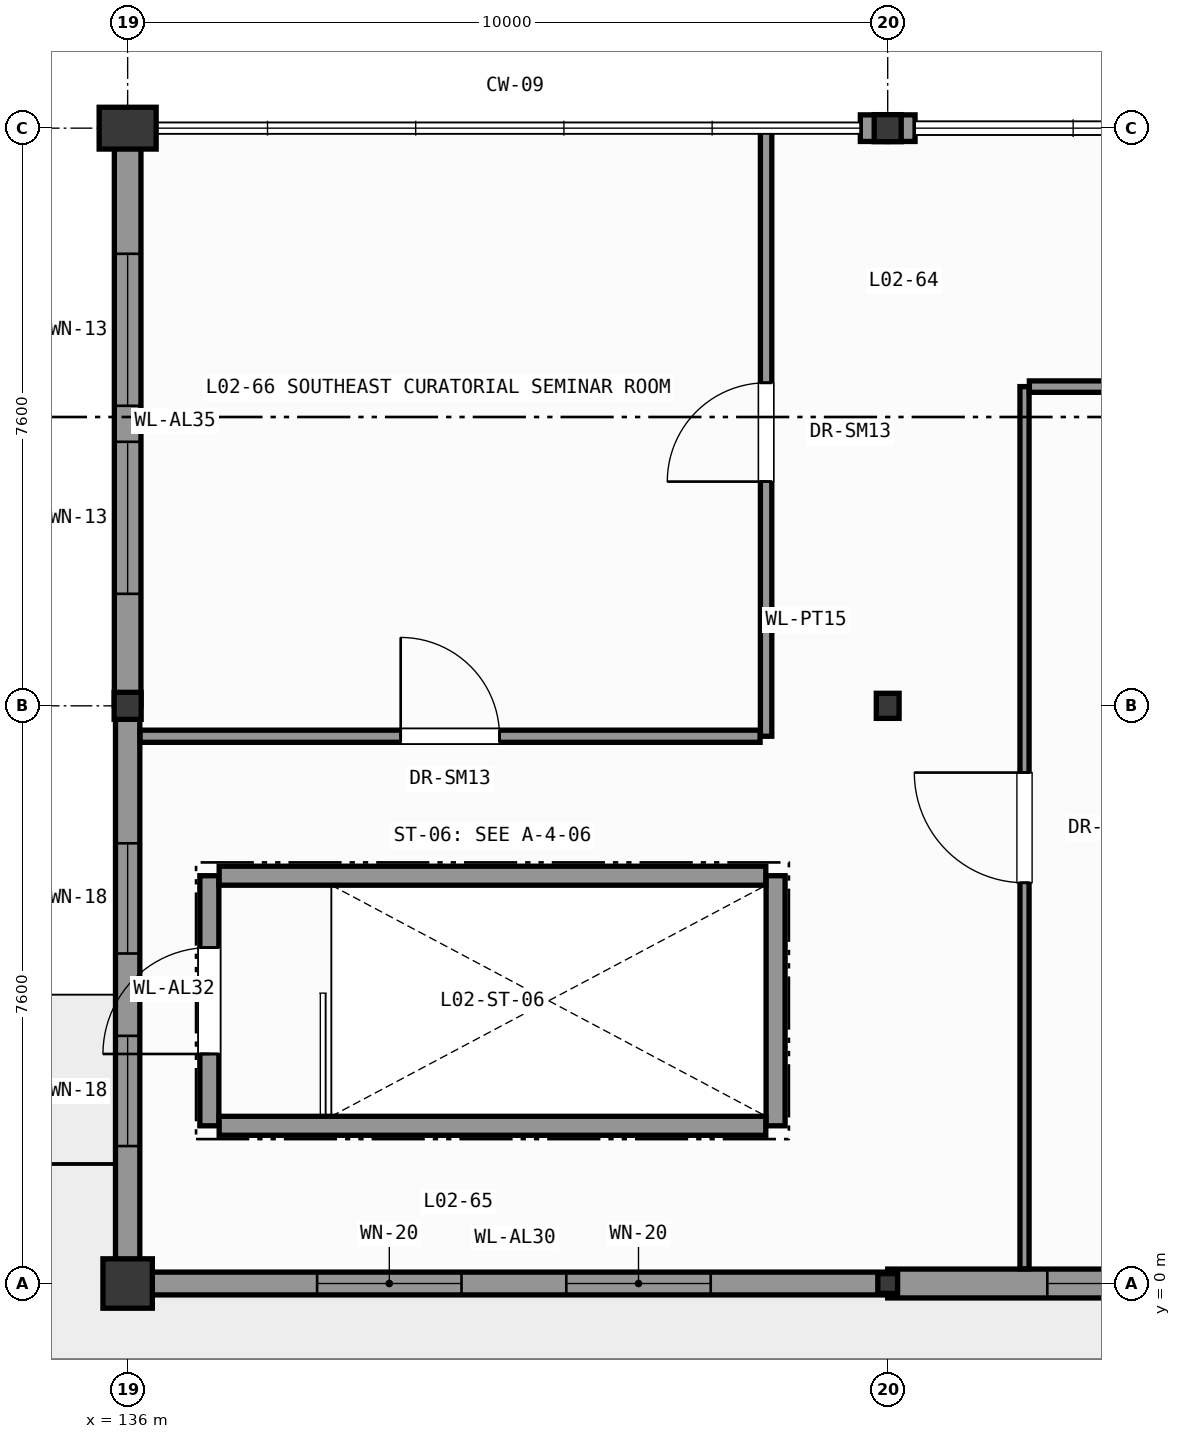
"""IFC4 building model, lengths in metres.
Left out: names, types, materials, properties, quantities, classifications, styles, units other than length and angle.
Written with IfcOpenShell. Run it as: python <this file> out.ifc"""

import sys

from ifc_helpers import new_model, si_unit, direction, frame, frame_2d, origin, origin_2d, place, context, subcontext, project, spatial, rectangle, hollow_rectangle, hollow_circle, i_section, extrude, element, fill, save


model = new_model("IFC4")
c1 = context("Model", 3, precision=1e-05, world=origin(), true_north=direction((0.0, 1.0)))
c2 = subcontext(c1, "Body", "Model", "MODEL_VIEW")
j1 = project(units=[si_unit("LENGTHUNIT", "METRE"), si_unit("PLANEANGLEUNIT", "RADIAN")], contexts=[c1])
p1 = place(None, origin())
s1 = spatial("IfcSite", under=j1, at=p1, CompositionType="ELEMENT")
p2 = place(p1, origin())
s2 = spatial("IfcBuilding", under=s1, at=p2, CompositionType="ELEMENT")
p3 = place(p2, frame((0.0, 0.0, 7.8)))
s3 = spatial("IfcBuildingStorey", under=s2, at=p3, CompositionType="ELEMENT", Elevation=7.8)
p4 = place(p3, frame((136.0, 0.0, 0.0), z_axis=(0.0, 0.0, 1.0), x_axis=(1.0, 0.0, 0.0)))
e1 = element("IfcColumn", 1, at=p4, inside=s3, PredefinedType="PILASTER", context=c2, shape_type="SweptSolid", body=[
    extrude(rectangle(XDim=0.65, YDim=0.65, at=origin_2d()), origin(), (0.0, 0.0, 1.0), 5.4),
])
p5 = place(p3, frame((136.0, 7.6, 0.0), z_axis=(0.0, 0.0, 1.0), x_axis=(1.0, 0.0, 0.0)))
e2 = element("IfcColumn", 2, at=p5, inside=s3, PredefinedType="COLUMN", context=c2, shape_type="SweptSolid", body=[
    extrude(hollow_circle(Radius=0.178, WallThickness=0.016, at=origin_2d()), origin(), (0.0, 0.0, 1.0), 5.4),
])
p6 = place(p3, frame((136.0, 15.2, 0.0), z_axis=(0.0, 0.0, 1.0), x_axis=(1.0, 0.0, 0.0)))
e3 = element("IfcColumn", 3, at=p6, inside=s3, PredefinedType="PILASTER", context=c2, shape_type="SweptSolid", body=[
    extrude(rectangle(XDim=0.75, YDim=0.55, at=origin_2d()), origin(), (0.0, 0.0, 1.0), 5.4),
])
p7 = place(p3, frame((146.0, 0.0, 0.0), z_axis=(0.0, 0.0, 1.0), x_axis=(1.0, 0.0, 0.0)))
e4 = element("IfcColumn", 4, at=p7, inside=s3, PredefinedType="COLUMN", context=c2, shape_type="SweptSolid", body=[
    extrude(hollow_rectangle(XDim=0.26, YDim=0.26, WallThickness=0.012, InnerFilletRadius=0.012, OuterFilletRadius=0.025, at=origin_2d()), origin(), (0.0, 0.0, 1.0), 5.4),
])
p8 = place(p3, frame((146.0, 7.6, 0.0), z_axis=(0.0, 0.0, 1.0), x_axis=(1.0, 0.0, 0.0)))
e5 = element("IfcColumn", 5, at=p8, inside=s3, PredefinedType="COLUMN", context=c2, shape_type="SweptSolid", body=[
    extrude(i_section(OverallWidth=0.3, OverallDepth=0.33, WebThickness=0.01, FlangeThickness=0.017, FilletRadius=0.027, at=origin_2d()), origin(), (0.0, 0.0, 1.0), 5.4),
])
p9 = place(p3, frame((146.0, 15.2, 0.0), z_axis=(0.0, 0.0, 1.0), x_axis=(1.0, 0.0, 0.0)))
e6 = element("IfcColumn", 6, at=p9, inside=s3, PredefinedType="COLUMN", context=c2, shape_type="SweptSolid", body=[
    extrude(hollow_circle(Radius=0.178, WallThickness=0.016, at=origin_2d()), origin(), (0.0, 0.0, 1.0), 5.4),
])
for number, where, z_axis, x_axis in (
    (7, (146.36, 15.2, 0.0), (0.0, 0.0, 1.0), (-1.0, 0.0, 0.0)),
    (8, (146.0, 15.2, 0.0), (0.0, 0.0, 1.0), (-1.0, 0.0, 0.0)),
    (9, (136.36, 15.2, 0.0), (0.0, 0.0, 1.0), (-1.0, 0.0, 0.0)),
):
    element("IfcWall", number, at=place(p3, frame(where, z_axis=z_axis, x_axis=x_axis)), inside=s3, PredefinedType="SOLIDWALL", context=c2, shape_type="SweptSolid", body=[
        extrude(rectangle(XDim=0.36, YDim=0.35, at=frame_2d((0.18, 0.0))), origin(), (0.0, 0.0, 1.0), 4.685),
    ])
p10 = place(p3, frame((136.0, 7.6, 0.0), z_axis=(0.0, 0.0, 1.0), x_axis=(0.0, 1.0, 0.0)))
e10 = element("IfcWall", 10, at=p10, inside=s3, PredefinedType="SOLIDWALL", context=c2, shape_type="SweptSolid", body=[
    extrude(rectangle(XDim=7.421, YDim=0.35, at=frame_2d((3.71, 0.0))), origin(), (0.0, 0.0, 1.0), 4.635),
])
p11 = place(p10, frame((1.474, 0.0, 0.95)))
e11 = element("IfcOpeningElement", 11, at=p11, cuts=e10, PredefinedType="OPENING", context=c2, shape_type="SweptSolid", body=[
    extrude(rectangle(XDim=2.0, YDim=2.2, at=frame_2d((1.0, 1.1))), frame((0.0, 0.185, 0.0), z_axis=(0.0, -1.0, 0.0), x_axis=(1.0, 0.0, 0.0)), (0.0, 0.0, 1.0), 0.37),
])
p12 = place(p10, frame((3.947, 0.0, 0.95)))
e12 = element("IfcOpeningElement", 12, at=p12, cuts=e10, PredefinedType="OPENING", context=c2, shape_type="SweptSolid", body=[
    extrude(rectangle(XDim=2.0, YDim=2.2, at=frame_2d((1.0, 1.1))), frame((0.0, 0.185, 0.0), z_axis=(0.0, -1.0, 0.0), x_axis=(1.0, 0.0, 0.0)), (0.0, 0.0, 1.0), 0.37),
])
p13 = place(p3, frame((136.0, 0.0, 0.0), z_axis=(0.0, 0.0, 1.0), x_axis=(0.0, 1.0, 0.0)))
e13 = element("IfcWall", 13, at=p13, inside=s3, PredefinedType="SOLIDWALL", context=c2, shape_type="SweptSolid", body=[
    extrude(rectangle(XDim=7.6, YDim=0.32, at=frame_2d((3.8, 0.0))), origin(), (0.0, 0.0, 1.0), 4.635),
])
p14 = place(p13, frame((1.808, 0.0, 0.95)))
e14 = element("IfcOpeningElement", 14, at=p14, cuts=e13, PredefinedType="OPENING", context=c2, shape_type="SweptSolid", body=[
    extrude(rectangle(XDim=1.45, YDim=2.5, at=frame_2d((0.725, 1.25))), frame((0.0, 0.17, 0.0), z_axis=(0.0, -1.0, 0.0), x_axis=(1.0, 0.0, 0.0)), (0.0, 0.0, 1.0), 0.34),
])
p15 = place(p13, frame((4.342, 0.0, 0.95)))
e15 = element("IfcOpeningElement", 15, at=p15, cuts=e13, PredefinedType="OPENING", context=c2, shape_type="SweptSolid", body=[
    extrude(rectangle(XDim=1.45, YDim=2.5, at=frame_2d((0.725, 1.25))), frame((0.0, 0.17, 0.0), z_axis=(0.0, -1.0, 0.0), x_axis=(1.0, 0.0, 0.0)), (0.0, 0.0, 1.0), 0.34),
])
p16 = place(p3, frame((146.0, 0.0, 0.0), z_axis=(0.0, 0.0, 1.0), x_axis=(-1.0, 0.0, 0.0)))
e16 = element("IfcWall", 16, at=p16, inside=s3, PredefinedType="SOLIDWALL", context=c2, shape_type="SweptSolid", body=[
    extrude(rectangle(XDim=9.836, YDim=0.3, at=frame_2d((4.918, 0.0))), origin(), (0.0, 0.0, 1.0), 4.745),
])
p17 = place(p16, frame((2.329, 0.0, 0.95)))
e17 = element("IfcOpeningElement", 17, at=p17, cuts=e16, PredefinedType="OPENING", context=c2, shape_type="SweptSolid", body=[
    extrude(rectangle(XDim=1.9, YDim=2.9, at=frame_2d((0.95, 1.45))), frame((0.0, 0.16, 0.0), z_axis=(0.0, -1.0, 0.0), x_axis=(1.0, 0.0, 0.0)), (0.0, 0.0, 1.0), 0.32),
])
p18 = place(p16, frame((5.607, 0.0, 0.95)))
e18 = element("IfcOpeningElement", 18, at=p18, cuts=e16, PredefinedType="OPENING", context=c2, shape_type="SweptSolid", body=[
    extrude(rectangle(XDim=1.9, YDim=2.9, at=frame_2d((0.95, 1.45))), frame((0.0, 0.16, 0.0), z_axis=(0.0, -1.0, 0.0), x_axis=(1.0, 0.0, 0.0)), (0.0, 0.0, 1.0), 0.32),
])
p19 = place(p3, frame((155.0, 0.0, 0.0), z_axis=(0.0, 0.0, 1.0), x_axis=(-1.0, 0.0, 0.0)))
e19 = element("IfcWall", 19, at=p19, inside=s3, PredefinedType="SOLIDWALL", context=c2, shape_type="SweptSolid", body=[
    extrude(rectangle(XDim=9.0, YDim=0.38, at=frame_2d((4.5, 0.0))), origin(), (0.0, 0.0, 1.0), 4.745),
])
p20 = place(p19, frame((1.9, 0.0, 0.95)))
e20 = element("IfcOpeningElement", 20, at=p20, cuts=e19, PredefinedType="OPENING", context=c2, shape_type="SweptSolid", body=[
    extrude(rectangle(XDim=2.3, YDim=3.3, at=frame_2d((1.15, 1.65))), frame((0.0, 0.2, 0.0), z_axis=(0.0, -1.0, 0.0), x_axis=(1.0, 0.0, 0.0)), (0.0, 0.0, 1.0), 0.4),
])
p21 = place(p19, frame((4.6, 0.0, 0.95)))
e21 = element("IfcOpeningElement", 21, at=p21, cuts=e19, PredefinedType="OPENING", context=c2, shape_type="SweptSolid", body=[
    extrude(rectangle(XDim=2.3, YDim=3.3, at=frame_2d((1.15, 1.65))), frame((0.0, 0.2, 0.0), z_axis=(0.0, -1.0, 0.0), x_axis=(1.0, 0.0, 0.0)), (0.0, 0.0, 1.0), 0.4),
])
p22 = place(p3, frame((137.075, 2.075, 0.0), z_axis=(0.0, 0.0, 1.0), x_axis=(0.0, 1.0, 0.0)))
e22 = element("IfcWall", 22, at=p22, inside=s3, PredefinedType="SHEAR", context=c2, shape_type="SweptSolid", body=[
    extrude(rectangle(XDim=3.29, YDim=0.25, at=frame_2d((1.645, 0.0))), origin(), (0.0, 0.0, 1.0), 5.15),
])
p23 = place(p22, frame((0.945, 0.0, 0.0)))
e23 = element("IfcOpeningElement", 23, at=p23, cuts=e22, PredefinedType="OPENING", context=c2, shape_type="SweptSolid", body=[
    extrude(rectangle(XDim=1.4, YDim=2.2, at=frame_2d((0.7, 1.1))), frame((0.0, 0.135, 0.0), z_axis=(0.0, -1.0, 0.0), x_axis=(1.0, 0.0, 0.0)), (0.0, 0.0, 1.0), 0.27),
])
p24 = place(p3, frame((144.525, 2.075, 0.0), z_axis=(0.0, 0.0, 1.0), x_axis=(0.0, 1.0, 0.0)))
e24 = element("IfcWall", 24, at=p24, inside=s3, PredefinedType="SHEAR", context=c2, shape_type="SweptSolid", body=[
    extrude(rectangle(XDim=3.29, YDim=0.25, at=frame_2d((1.645, 0.0))), origin(), (0.0, 0.0, 1.0), 5.15),
])
for number, where, z_axis, x_axis in (
    (25, (137.204, 2.075, 0.0), (0.0, 0.0, 1.0), (1.0, 0.0, 0.0)),
    (26, (137.204, 5.365, 0.0), (0.0, 0.0, 1.0), (1.0, 0.0, 0.0)),
):
    element("IfcWall", number, at=place(p3, frame(where, z_axis=z_axis, x_axis=x_axis)), inside=s3, PredefinedType="SHEAR", context=c2, shape_type="SweptSolid", body=[
        extrude(rectangle(XDim=7.192, YDim=0.25, at=frame_2d((3.596, 0.0))), origin(), (0.0, 0.0, 1.0), 5.15),
    ])
p25 = place(p3, frame((144.4, 7.2, 0.0), z_axis=(0.0, 0.0, 1.0), x_axis=(0.0, 1.0, 0.0)))
e27 = element("IfcWall", 27, at=p25, inside=s3, PredefinedType="PARTITIONING", context=c2, shape_type="SweptSolid", body=[
    extrude(rectangle(XDim=8.0, YDim=0.15, at=frame_2d((4.0, 0.0))), origin(), (0.0, 0.0, 1.0), 5.15),
])
p26 = place(p25, frame((3.35, 0.0, 0.0)))
e28 = element("IfcOpeningElement", 28, at=p26, cuts=e27, PredefinedType="OPENING", context=c2, shape_type="SweptSolid", body=[
    extrude(rectangle(XDim=1.3, YDim=2.25, at=frame_2d((0.65, 1.125))), frame((0.0, 0.085, 0.0), z_axis=(0.0, -1.0, 0.0), x_axis=(1.0, 0.0, 0.0)), (0.0, 0.0, 1.0), 0.17),
])
p27 = place(p3, frame((147.8, 0.194, 0.0), z_axis=(0.0, 0.0, 1.0), x_axis=(0.0, 1.0, 0.0)))
e29 = element("IfcWall", 29, at=p27, inside=s3, PredefinedType="PARTITIONING", context=c2, shape_type="SweptSolid", body=[
    extrude(rectangle(XDim=11.606, YDim=0.12, at=frame_2d((5.803, 0.0))), origin(), (0.0, 0.0, 1.0), 5.15),
])
p28 = place(p27, frame((5.078, 0.0, 0.0)))
e30 = element("IfcOpeningElement", 30, at=p28, cuts=e29, PredefinedType="OPENING", context=c2, shape_type="SweptSolid", body=[
    extrude(rectangle(XDim=1.45, YDim=2.35, at=frame_2d((0.725, 1.175))), frame((0.0, 0.07, 0.0), z_axis=(0.0, -1.0, 0.0), x_axis=(1.0, 0.0, 0.0)), (0.0, 0.0, 1.0), 0.14),
])
p29 = place(p3, frame((136.164, 7.2, 0.0), z_axis=(0.0, 0.0, 1.0), x_axis=(1.0, 0.0, 0.0)))
e31 = element("IfcWall", 31, at=p29, inside=s3, PredefinedType="PARTITIONING", context=c2, shape_type="SweptSolid", body=[
    extrude(rectangle(XDim=8.157, YDim=0.16, at=frame_2d((4.079, 0.0))), origin(), (0.0, 0.0, 1.0), 5.15),
])
p30 = place(p29, frame((3.428, 0.0, 0.0)))
e32 = element("IfcOpeningElement", 32, at=p30, cuts=e31, PredefinedType="OPENING", context=c2, shape_type="SweptSolid", body=[
    extrude(rectangle(XDim=1.3, YDim=2.25, at=frame_2d((0.65, 1.125))), frame((0.0, 0.09, 0.0), z_axis=(0.0, -1.0, 0.0), x_axis=(1.0, 0.0, 0.0)), (0.0, 0.0, 1.0), 0.18),
])
p31 = place(p3, frame((147.864, 11.8, 0.0), z_axis=(0.0, 0.0, 1.0), x_axis=(1.0, 0.0, 0.0)))
e33 = element("IfcWall", 33, at=p31, inside=s3, PredefinedType="PARTITIONING", context=c2, shape_type="SweptSolid", body=[
    extrude(rectangle(XDim=18.136, YDim=0.15, at=frame_2d((9.068, 0.0))), origin(), (0.0, 0.0, 1.0), 5.15),
])
p32 = place(p31, frame((8.343, 0.0, 0.0)))
e34 = element("IfcOpeningElement", 34, at=p32, cuts=e33, PredefinedType="OPENING", context=c2, shape_type="SweptSolid", body=[
    extrude(rectangle(XDim=1.45, YDim=2.35, at=frame_2d((0.725, 1.175))), frame((0.0, 0.085, 0.0), z_axis=(0.0, -1.0, 0.0), x_axis=(1.0, 0.0, 0.0)), (0.0, 0.0, 1.0), 0.17),
])
p33 = place(p11, origin())
e35 = element("IfcWindow", 35, at=p33, inside=s3, PartitioningType="SINGLE_PANEL", PredefinedType="WINDOW", context=c2, shape_type="SweptSolid", body=[
    extrude(rectangle(XDim=2.0, YDim=2.2, at=frame_2d((1.0, 1.1))), frame((0.0, 0.03, 0.0), z_axis=(0.0, -1.0, 0.0), x_axis=(1.0, 0.0, 0.0)), (0.0, 0.0, 1.0), 0.06),
])
fill(e11, e35)
p34 = place(p12, origin())
e36 = element("IfcWindow", 36, at=p34, inside=s3, PartitioningType="SINGLE_PANEL", PredefinedType="WINDOW", context=c2, shape_type="SweptSolid", body=[
    extrude(rectangle(XDim=2.0, YDim=2.2, at=frame_2d((1.0, 1.1))), frame((0.0, 0.03, 0.0), z_axis=(0.0, -1.0, 0.0), x_axis=(1.0, 0.0, 0.0)), (0.0, 0.0, 1.0), 0.06),
])
fill(e12, e36)
p35 = place(p14, origin())
e37 = element("IfcWindow", 37, at=p35, inside=s3, PartitioningType="SINGLE_PANEL", PredefinedType="WINDOW", context=c2, shape_type="SweptSolid", body=[
    extrude(rectangle(XDim=1.45, YDim=2.5, at=frame_2d((0.725, 1.25))), frame((0.0, 0.03, 0.0), z_axis=(0.0, -1.0, 0.0), x_axis=(1.0, 0.0, 0.0)), (0.0, 0.0, 1.0), 0.06),
])
fill(e14, e37)
p36 = place(p15, origin())
e38 = element("IfcWindow", 38, at=p36, inside=s3, PartitioningType="SINGLE_PANEL", PredefinedType="WINDOW", context=c2, shape_type="SweptSolid", body=[
    extrude(rectangle(XDim=1.45, YDim=2.5, at=frame_2d((0.725, 1.25))), frame((0.0, 0.03, 0.0), z_axis=(0.0, -1.0, 0.0), x_axis=(1.0, 0.0, 0.0)), (0.0, 0.0, 1.0), 0.06),
])
fill(e15, e38)
p37 = place(p17, origin())
e39 = element("IfcWindow", 39, at=p37, inside=s3, PartitioningType="SINGLE_PANEL", PredefinedType="WINDOW", context=c2, shape_type="SweptSolid", body=[
    extrude(rectangle(XDim=1.9, YDim=2.9, at=frame_2d((0.95, 1.45))), frame((0.0, 0.03, 0.0), z_axis=(0.0, -1.0, 0.0), x_axis=(1.0, 0.0, 0.0)), (0.0, 0.0, 1.0), 0.06),
])
fill(e17, e39)
p38 = place(p18, origin())
e40 = element("IfcWindow", 40, at=p38, inside=s3, PartitioningType="SINGLE_PANEL", PredefinedType="WINDOW", context=c2, shape_type="SweptSolid", body=[
    extrude(rectangle(XDim=1.9, YDim=2.9, at=frame_2d((0.95, 1.45))), frame((0.0, 0.03, 0.0), z_axis=(0.0, -1.0, 0.0), x_axis=(1.0, 0.0, 0.0)), (0.0, 0.0, 1.0), 0.06),
])
fill(e18, e40)
p39 = place(p21, origin())
e41 = element("IfcWindow", 41, at=p39, inside=s3, PartitioningType="SINGLE_PANEL", PredefinedType="WINDOW", context=c2, shape_type="SweptSolid", body=[
    extrude(rectangle(XDim=2.3, YDim=3.3, at=frame_2d((1.15, 1.65))), frame((0.0, 0.03, 0.0), z_axis=(0.0, -1.0, 0.0), x_axis=(1.0, 0.0, 0.0)), (0.0, 0.0, 1.0), 0.06),
])
fill(e21, e41)
p40 = place(p23, origin())
e42 = element("IfcDoor", 42, at=p40, inside=s3, OperationType="SINGLE_SWING_LEFT", PredefinedType="DOOR", context=c2, shape_type="SweptSolid", body=[
    extrude(rectangle(XDim=1.4, YDim=2.2, at=frame_2d((0.7, 1.1))), frame((0.0, 0.025, 0.0), z_axis=(0.0, -1.0, 0.0), x_axis=(1.0, 0.0, 0.0)), (0.0, 0.0, 1.0), 0.05),
])
fill(e23, e42)
p41 = place(p26, origin())
e43 = element("IfcDoor", 43, at=p41, inside=s3, OperationType="SINGLE_SWING_LEFT", PredefinedType="DOOR", context=c2, shape_type="SweptSolid", body=[
    extrude(rectangle(XDim=1.3, YDim=2.25, at=frame_2d((0.65, 1.125))), frame((0.0, 0.025, 0.0), z_axis=(0.0, -1.0, 0.0), x_axis=(1.0, 0.0, 0.0)), (0.0, 0.0, 1.0), 0.05),
])
fill(e28, e43)
p42 = place(p28, origin())
e44 = element("IfcDoor", 44, at=p42, inside=s3, OperationType="SINGLE_SWING_RIGHT", PredefinedType="DOOR", context=c2, shape_type="SweptSolid", body=[
    extrude(rectangle(XDim=1.45, YDim=2.35, at=frame_2d((0.725, 1.175))), frame((0.0, 0.025, 0.0), z_axis=(0.0, -1.0, 0.0), x_axis=(1.0, 0.0, 0.0)), (0.0, 0.0, 1.0), 0.05),
])
fill(e30, e44)
p43 = place(p30, origin())
e45 = element("IfcDoor", 45, at=p43, inside=s3, OperationType="SINGLE_SWING_LEFT", PredefinedType="DOOR", context=c2, shape_type="SweptSolid", body=[
    extrude(rectangle(XDim=1.3, YDim=2.25, at=frame_2d((0.65, 1.125))), frame((0.0, 0.025, 0.0), z_axis=(0.0, -1.0, 0.0), x_axis=(1.0, 0.0, 0.0)), (0.0, 0.0, 1.0), 0.05),
])
fill(e32, e45)
save(model, sys.argv[1])
